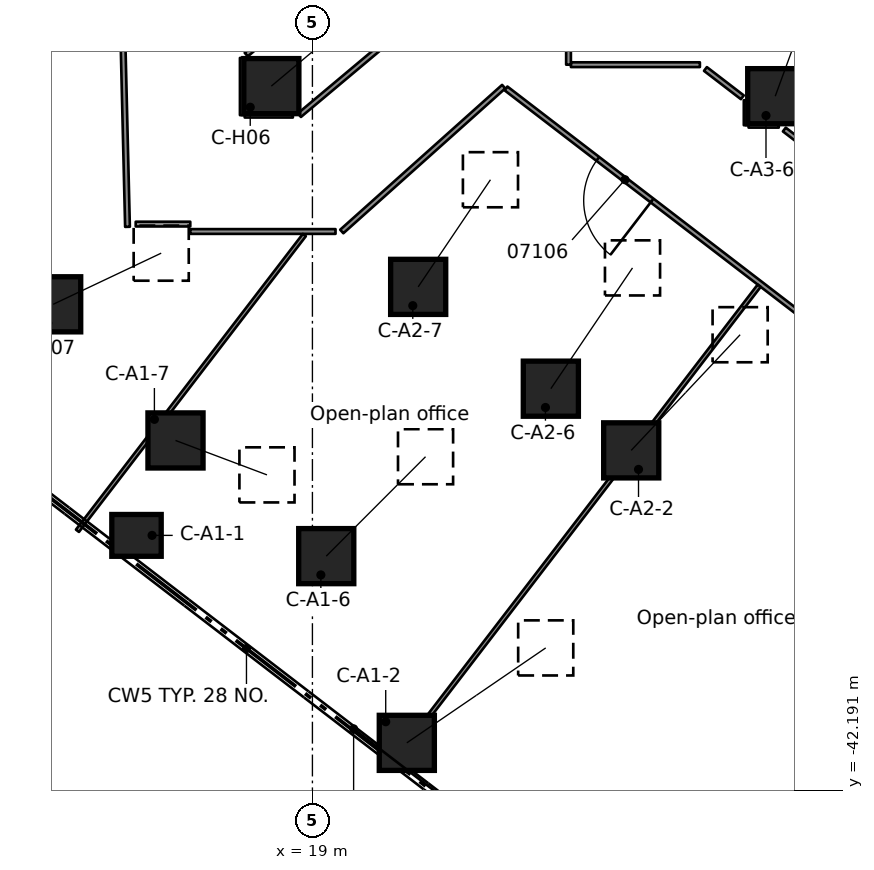
"""IFC4 building model, lengths in metres.
Left out: names, types, materials, properties, quantities, classifications, styles, units other than length and angle.
Written with IfcOpenShell. Run it as: python <this file> out.ifc"""

import sys

from ifc_helpers import new_model, si_unit, direction, frame, frame_2d, origin, origin_2d, place, context, subcontext, project, spatial, rectangle, extrude, element, fill, save


model = new_model("IFC4")
c1 = context("Model", 3, precision=1e-05, world=origin(), true_north=direction((0.0, 1.0)))
c2 = subcontext(c1, "Body", "Model", "MODEL_VIEW")
j1 = project(units=[si_unit("LENGTHUNIT", "METRE"), si_unit("PLANEANGLEUNIT", "RADIAN")], contexts=[c1])
p1 = place(None, origin())
s1 = spatial("IfcSite", under=j1, at=p1, CompositionType="ELEMENT")
p2 = place(p1, origin())
s2 = spatial("IfcBuilding", under=s1, at=p2, CompositionType="ELEMENT")
p3 = place(p2, frame((0.0, 0.0, 33.3)))
s3 = spatial("IfcBuildingStorey", under=s2, at=p3, CompositionType="ELEMENT", Elevation=33.3)
p4 = place(p3, frame((14.371, -35.48, 0.0), z_axis=(0.0, 0.0, 1.0), x_axis=(1.0, 0.0, 0.0)))
e1 = element("IfcColumn", 1, at=p4, inside=s3, PredefinedType="COLUMN", context=c2, shape_type="SweptSolid", body=[
    extrude(rectangle(XDim=1.3, YDim=1.1, at=origin_2d()), origin(), (0.0, 0.0, 1.0), 4.0),
])
p5 = place(p3, frame((21.484, -40.939, 0.615), z_axis=(0.699835860941, 0.478306093724, 0.530521487263), x_axis=(-0.564258796598, 0.82559797145, 0.0)))
e2 = element("IfcColumn", 2, at=p5, inside=s3, PredefinedType="COLUMN", context=c2, shape_type="SweptSolid", body=[
    extrude(rectangle(XDim=1.45, YDim=1.45, at=origin_2d()), origin(), (0.0, 0.0, 1.0), 5.223),
])
p6 = place(p3, frame((19.364, -36.026, 0.574), z_axis=(0.559599128352, 0.560226540249, 0.610733198008), x_axis=(-0.707502845384, 0.706710495021, 0.0)))
e3 = element("IfcColumn", 3, at=p6, inside=s3, PredefinedType="COLUMN", context=c2, shape_type="SweptSolid", body=[
    extrude(rectangle(XDim=1.45, YDim=1.45, at=origin_2d()), origin(), (0.0, 0.0, 1.0), 4.669),
])
p7 = place(p3, frame((15.397, -32.982, 0.466), z_axis=(0.601168412717, -0.226284205253, 0.766415029866), x_axis=(0.352277915525, 0.93589543766, 0.0)))
e4 = element("IfcColumn", 4, at=p7, inside=s3, PredefinedType="COLUMN", context=c2, shape_type="SweptSolid", body=[
    extrude(rectangle(XDim=1.45, YDim=1.45, at=origin_2d()), origin(), (0.0, 0.0, 1.0), 4.004),
])
p8 = place(p3, frame((27.389, -33.243, 0.603), z_axis=(0.569969065996, 0.605170324437, 0.555791455699), x_axis=(-0.727961612842, 0.685617889373, 0.0)))
e5 = element("IfcColumn", 5, at=p8, inside=s3, PredefinedType="COLUMN", context=c2, shape_type="SweptSolid", body=[
    extrude(rectangle(XDim=1.45, YDim=1.45, at=origin_2d()), origin(), (0.0, 0.0, 1.0), 5.028),
])
p9 = place(p3, frame((25.274, -31.62, 0.583), z_axis=(0.450601018397, 0.666355112745, 0.594078770819), x_axis=(-0.828380682455, 0.560165551364, 0.0)))
e6 = element("IfcColumn", 6, at=p9, inside=s3, PredefinedType="COLUMN", context=c2, shape_type="SweptSolid", body=[
    extrude(rectangle(XDim=1.45, YDim=1.45, at=origin_2d()), origin(), (0.0, 0.0, 1.0), 4.77),
])
p10 = place(p3, frame((21.783, -28.941, 0.552), z_axis=(0.425847814082, 0.631092139827, 0.648364365376), x_axis=(-0.828933559632, 0.559347078044, 0.0)))
e7 = element("IfcColumn", 7, at=p10, inside=s3, PredefinedType="COLUMN", context=c2, shape_type="SweptSolid", body=[
    extrude(rectangle(XDim=1.45, YDim=1.45, at=origin_2d()), origin(), (0.0, 0.0, 1.0), 4.467),
])
p11 = place(p3, frame((31.179, -23.924, 0.591), z_axis=(0.279657049767, 0.765530427024, 0.579443784862), x_axis=(-0.939287067036, 0.343132344292, 0.0)))
e8 = element("IfcColumn", 8, at=p11, inside=s3, PredefinedType="COLUMN", context=c2, shape_type="SweptSolid", body=[
    extrude(rectangle(XDim=1.45, YDim=1.45, at=origin_2d()), origin(), (0.0, 0.0, 1.0), 4.864),
])
p12 = place(p3, frame((17.919, -23.659, 0.508), z_axis=(0.537268679687, 0.450505155937, 0.713012952408), x_axis=(-0.642522431446, 0.766266875891, 0.0)))
e9 = element("IfcColumn", 9, at=p12, inside=s3, PredefinedType="COLUMN", context=c2, shape_type="SweptSolid", body=[
    extrude(rectangle(XDim=1.45, YDim=1.45, at=origin_2d()), origin(), (0.0, 0.0, 1.0), 4.184),
])
p13 = place(p3, frame((12.178, -29.4, 0.53), z_axis=(0.660215598589, 0.312560635038, 0.682950373603), x_axis=(-0.427892823623, 0.903829481424, 0.0)))
e10 = element("IfcColumn", 10, at=p13, inside=s3, PredefinedType="COLUMN", context=c2, shape_type="SweptSolid", body=[
    extrude(rectangle(XDim=1.45, YDim=1.45, at=origin_2d()), origin(), (0.0, 0.0, 1.0), 4.306),
])
p14 = place(p3, frame((13.928, -18.903, 0.0), z_axis=(0.0, 0.0, 1.0), x_axis=(0.024354856534, -0.999703376489, 0.0)))
e11 = element("IfcWall", 11, at=p14, inside=s3, PredefinedType="PARTITIONING", context=c2, shape_type="SweptSolid", body=[
    extrude(rectangle(XDim=8.46, YDim=0.125, at=frame_2d((4.23, 0.0))), origin(), (0.0, 0.0, 1.0), 3.56),
])
p15 = place(p3, frame((37.331, -33.877, 0.0), z_axis=(0.0, 0.0, 1.0), x_axis=(-0.793351723993, 0.608763535404, 0.0)))
e12 = element("IfcWall", 12, at=p15, inside=s3, PredefinedType="PARTITIONING", context=c2, shape_type="SweptSolid", body=[
    extrude(rectangle(XDim=16.686, YDim=0.125, at=frame_2d((8.343, 0.0))), origin(), (0.0, 0.0, 1.0), 3.56),
])
p16 = place(p15, frame((11.84, 0.0, 0.0)))
e13 = element("IfcOpeningElement", 13, at=p16, cuts=e12, PredefinedType="OPENING", context=c2, shape_type="SweptSolid", body=[
    extrude(rectangle(XDim=1.8, YDim=2.1, at=frame_2d((0.9, 1.05))), frame((0.0, 0.073, 0.0), z_axis=(0.0, -1.0, 0.0), x_axis=(1.0, 0.0, 0.0)), (0.0, 0.0, 1.0), 0.145),
])
p17 = place(p15, frame((3.166, 0.0, 0.0)))
e14 = element("IfcOpeningElement", 14, at=p17, cuts=e12, PredefinedType="OPENING", context=c2, shape_type="SweptSolid", body=[
    extrude(rectangle(XDim=1.8, YDim=2.1, at=frame_2d((0.9, 1.05))), frame((0.0, 0.073, 0.0), z_axis=(0.0, -1.0, 0.0), x_axis=(1.0, 0.0, 0.0)), (0.0, 0.0, 1.0), 0.145),
])
p18 = place(p3, frame((29.342, -23.208, 0.0), z_axis=(0.0, 0.0, 1.0), x_axis=(0.793416873322, -0.608678622204, 0.0)))
e15 = element("IfcWall", 15, at=p18, inside=s3, PredefinedType="PARTITIONING", context=c2, shape_type="SweptSolid", body=[
    extrude(rectangle(XDim=1.224, YDim=0.125, at=frame_2d((0.612, 0.0))), origin(), (0.0, 0.0, 1.0), 3.56),
])
p19 = place(p3, frame((31.418, -24.801, 0.0), z_axis=(0.0, 0.0, 1.0), x_axis=(0.793393328304, -0.608709312071, 0.0)))
e16 = element("IfcWall", 16, at=p19, inside=s3, PredefinedType="PARTITIONING", context=c2, shape_type="SweptSolid", body=[
    extrude(rectangle(XDim=1.273, YDim=0.125, at=frame_2d((0.636, 0.0))), origin(), (0.0, 0.0, 1.0), 3.56),
])
p20 = place(p3, frame((15.786, -27.484, 0.0), z_axis=(0.0, 0.0, 1.0), x_axis=(1.0, 0.0, 0.0)))
e17 = element("IfcWall", 17, at=p20, inside=s3, PredefinedType="PARTITIONING", context=c2, shape_type="SweptSolid", body=[
    extrude(rectangle(XDim=3.822, YDim=0.125, at=frame_2d((1.911, 0.0))), origin(), (0.0, 0.0, 1.0), 3.56),
])
p21 = place(p3, frame((14.35, -27.289, 0.0), z_axis=(0.0, 0.0, 1.0), x_axis=(1.0, 0.0, 0.0)))
e18 = element("IfcWall", 18, at=p21, inside=s3, PredefinedType="PARTITIONING", context=c2, shape_type="SweptSolid", body=[
    extrude(rectangle(XDim=1.436, YDim=0.125, at=frame_2d((0.718, 0.0))), origin(), (0.0, 0.0, 1.0), 3.56),
])
p22 = place(p3, frame((30.477, -24.688, 0.0), z_axis=(0.0, 0.0, 1.0), x_axis=(1.0, 0.0, 0.0)))
e19 = element("IfcWall", 19, at=p22, inside=s3, PredefinedType="PARTITIONING", context=c2, shape_type="SweptSolid", body=[
    extrude(rectangle(XDim=0.795, YDim=0.125, at=frame_2d((0.397, 0.0))), origin(), (0.0, 0.0, 1.0), 3.56),
])
p23 = place(p3, frame((17.218, -24.423, 0.0), z_axis=(0.0, 0.0, 1.0), x_axis=(1.0, 0.0, 0.0)))
e20 = element("IfcWall", 20, at=p23, inside=s3, PredefinedType="PARTITIONING", context=c2, shape_type="SweptSolid", body=[
    extrude(rectangle(XDim=1.268, YDim=0.125, at=frame_2d((0.634, 0.0))), origin(), (0.0, 0.0, 1.0), 3.56),
])
p24 = place(p3, frame((25.802, -23.095, 0.0), z_axis=(0.0, 0.0, 1.0), x_axis=(1.0, 0.0, 0.0)))
e21 = element("IfcWall", 21, at=p24, inside=s3, PredefinedType="PARTITIONING", context=c2, shape_type="SweptSolid", body=[
    extrude(rectangle(XDim=3.394, YDim=0.125, at=frame_2d((1.697, 0.0))), origin(), (0.0, 0.0, 1.0), 3.56),
])
p25 = place(p3, frame((19.772, -27.484, 0.0), z_axis=(0.0, 0.0, 1.0), x_axis=(0.74538650379, 0.666632552436, 0.0)))
e22 = element("IfcWall", 22, at=p25, inside=s3, PredefinedType="PARTITIONING", context=c2, shape_type="SweptSolid", body=[
    extrude(rectangle(XDim=5.717, YDim=0.125, at=frame_2d((2.858, 0.0))), origin(), (0.0, 0.0, 1.0), 3.56),
])
p26 = place(p3, frame((18.658, -24.423, 0.0), z_axis=(0.0, 0.0, 1.0), x_axis=(0.76634618158, 0.642427840288, 0.0)))
e23 = element("IfcWall", 23, at=p26, inside=s3, PredefinedType="PARTITIONING", context=c2, shape_type="SweptSolid", body=[
    extrude(rectangle(XDim=2.833, YDim=0.125, at=frame_2d((1.417, 0.0))), origin(), (0.0, 0.0, 1.0), 3.56),
])
p27 = place(p3, frame((17.258, -22.83, 0.0), z_axis=(0.0, 0.0, 1.0), x_axis=(0.764978484878, 0.644055834283, 0.0)))
e24 = element("IfcWall", 24, at=p27, inside=s3, PredefinedType="PARTITIONING", context=c2, shape_type="SweptSolid", body=[
    extrude(rectangle(XDim=0.47, YDim=0.125, at=frame_2d((0.235, 0.0))), origin(), (0.0, 0.0, 1.0), 3.56),
])
p28 = place(p3, frame((28.054, -47.051, 0.0), z_axis=(0.0, 0.0, 1.0), x_axis=(0.608787965218, 0.793332977636, 0.0)))
e25 = element("IfcWall", 25, at=p28, inside=s3, PredefinedType="PARTITIONING", context=c2, shape_type="SweptSolid", body=[
    extrude(rectangle(XDim=16.347, YDim=0.1, at=frame_2d((8.174, 0.0))), origin(), (0.0, 0.0, 1.0), 3.56),
])
p29 = place(p3, frame((20.993, -41.633, 0.0), z_axis=(0.0, 0.0, 1.0), x_axis=(0.608805416173, 0.793319585816, 0.0)))
e26 = element("IfcWall", 26, at=p29, inside=s3, PredefinedType="PARTITIONING", context=c2, shape_type="SweptSolid", body=[
    extrude(rectangle(XDim=16.037, YDim=0.1, at=frame_2d((8.018, 0.0))), origin(), (0.0, 0.0, 1.0), 3.56),
])
p30 = place(p3, frame((12.817, -35.359, 0.0), z_axis=(0.0, 0.0, 1.0), x_axis=(0.608752848143, 0.793359924547, 0.0)))
e27 = element("IfcWall", 27, at=p30, inside=s3, PredefinedType="PARTITIONING", context=c2, shape_type="SweptSolid", body=[
    extrude(rectangle(XDim=9.809, YDim=0.1, at=frame_2d((4.904, 0.0))), origin(), (0.0, 0.0, 1.0), 3.56),
])
p31 = place(p3, frame((30.414, -24.688, 0.0), z_axis=(0.0, 0.0, 1.0), x_axis=(0.0, 1.0, 0.0)))
e28 = element("IfcWall", 28, at=p31, inside=s3, PredefinedType="PARTITIONING", context=c2, shape_type="SweptSolid", body=[
    extrude(rectangle(XDim=0.658, YDim=0.125, at=frame_2d((0.329, 0.0))), origin(), (0.0, 0.0, 1.0), 3.56),
])
p32 = place(p3, frame((25.739, -23.095, 0.0), z_axis=(0.0, 0.0, 1.0), x_axis=(0.0, 1.0, 0.0)))
e29 = element("IfcWall", 29, at=p32, inside=s3, PredefinedType="PARTITIONING", context=c2, shape_type="SweptSolid", body=[
    extrude(rectangle(XDim=2.652, YDim=0.125, at=frame_2d((1.326, 0.0))), origin(), (0.0, 0.0, 1.0), 3.56),
])
p33 = place(p3, frame((17.155, -24.423, 0.0), z_axis=(0.0, 0.0, 1.0), x_axis=(0.0, 1.0, 0.0)))
e30 = element("IfcWall", 30, at=p33, inside=s3, PredefinedType="PARTITIONING", context=c2, shape_type="SweptSolid", body=[
    extrude(rectangle(XDim=1.507, YDim=0.125, at=frame_2d((0.753, 0.0))), origin(), (0.0, 0.0, 1.0), 3.56),
])
p34 = place(p16, origin())
e31 = element("IfcDoor", 31, at=p34, inside=s3, OperationType="DOUBLE_DOOR_SINGLE_SWING", PredefinedType="DOOR", context=c2, shape_type="SweptSolid", body=[
    extrude(rectangle(XDim=1.8, YDim=2.1, at=frame_2d((0.9, 1.05))), frame((0.0, 0.025, 0.0), z_axis=(0.0, -1.0, 0.0), x_axis=(1.0, 0.0, 0.0)), (0.0, 0.0, 1.0), 0.05),
])
fill(e13, e31)
save(model, sys.argv[1])
